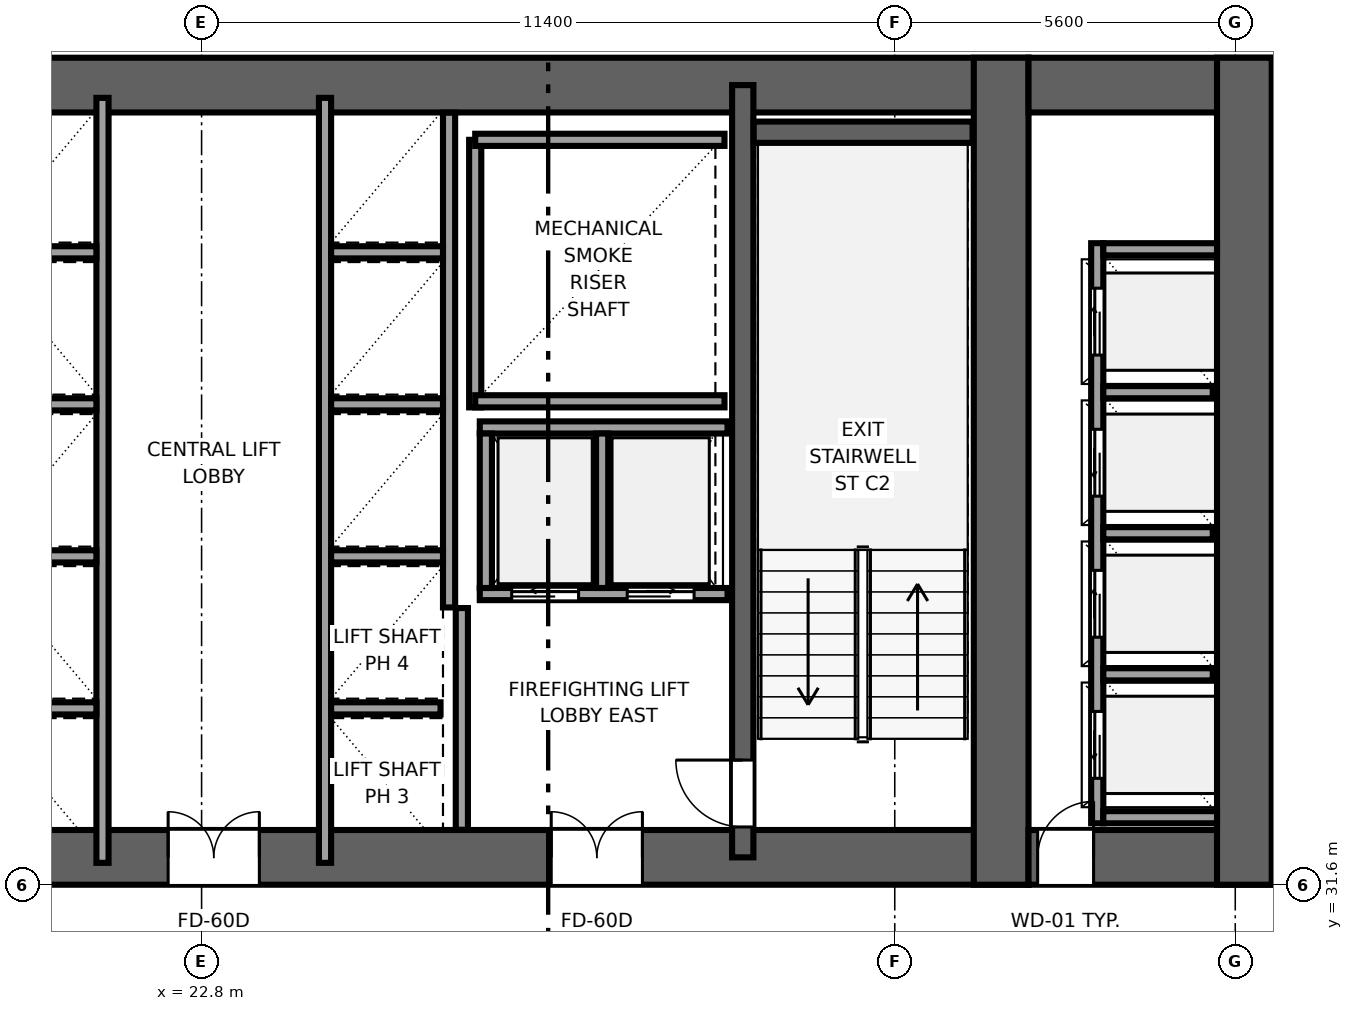
"""IFC4 building model, lengths in metres.
Left out: names, types, materials, properties, quantities, classifications, styles, units other than length and angle.
Written with IfcOpenShell. Run it as: python <this file> out.ifc"""

import sys

from ifc_helpers import new_model, si_unit, direction, frame, frame_2d, origin, place, context, subcontext, project, spatial, rectangle, extrude, source, transform, mapped, element, fill, save


model = new_model("IFC4")
c1 = context("Model", 3, precision=1e-05, world=origin(), true_north=direction((0.0, 1.0)))
c2 = subcontext(c1, "Body", "Model", "MODEL_VIEW")
j1 = project(units=[si_unit("LENGTHUNIT", "METRE"), si_unit("PLANEANGLEUNIT", "RADIAN")], contexts=[c1])
p1 = place(None, origin())
s1 = spatial("IfcSite", under=j1, at=p1, CompositionType="ELEMENT")
p2 = place(p1, origin())
s2 = spatial("IfcBuilding", under=s1, at=p2, CompositionType="ELEMENT")
p3 = place(p2, frame((0.0, 0.0, 35.55)))
s3 = spatial("IfcBuildingStorey", under=s2, at=p3, CompositionType="ELEMENT", Elevation=35.55)
p4 = place(p3, frame((9.6, 32.05, 0.0), z_axis=(0.0, 0.0, 1.0), x_axis=(1.0, 0.0, 0.0)))
e1 = element("IfcWall", 1, at=p4, inside=s3, PredefinedType="SHEAR", context=c2, shape_type="SweptSolid", body=[
    extrude(rectangle(XDim=26.8, YDim=0.9, at=frame_2d((13.4, 0.0))), origin(), (0.0, 0.0, 1.0), 3.55),
])
p5 = place(p4, frame((6.52, 0.0, 0.0), z_axis=(0.0, 0.0, 1.0), x_axis=(-1.0, 0.0, 0.0)))
e2 = element("IfcOpeningElement", 2, at=p5, cuts=e1, PredefinedType="OPENING", context=c2, shape_type="SweptSolid", body=[
    extrude(rectangle(XDim=1.5, YDim=2.04, at=frame_2d((0.75, 1.02))), frame((0.0, 0.46, 0.0), z_axis=(0.0, -1.0, 0.0), x_axis=(1.0, 0.0, 0.0)), (0.0, 0.0, 1.0), 0.92),
])
p6 = place(p4, frame((14.15, 0.0, 0.0), z_axis=(0.0, 0.0, 1.0), x_axis=(-1.0, 0.0, 0.0)))
e3 = element("IfcOpeningElement", 3, at=p6, cuts=e1, PredefinedType="OPENING", context=c2, shape_type="SweptSolid", body=[
    extrude(rectangle(XDim=1.5, YDim=2.04, at=frame_2d((0.75, 1.02))), frame((0.0, 0.46, 0.0), z_axis=(0.0, -1.0, 0.0), x_axis=(1.0, 0.0, 0.0)), (0.0, 0.0, 1.0), 0.92),
])
p7 = place(p4, frame((20.45, 0.0, 0.0), z_axis=(0.0, 0.0, 1.0), x_axis=(-1.0, 0.0, 0.0)))
e4 = element("IfcOpeningElement", 4, at=p7, cuts=e1, PredefinedType="OPENING", context=c2, shape_type="SweptSolid", body=[
    extrude(rectangle(XDim=1.5, YDim=2.04, at=frame_2d((0.75, 1.02))), frame((0.0, 0.46, 0.0), z_axis=(0.0, -1.0, 0.0), x_axis=(1.0, 0.0, 0.0)), (0.0, 0.0, 1.0), 0.92),
])
p8 = place(p4, frame((8.57, 0.0, 0.0), z_axis=(0.0, 0.0, 1.0), x_axis=(-1.0, 0.0, 0.0)))
e5 = element("IfcOpeningElement", 5, at=p8, cuts=e1, PredefinedType="OPENING", context=c2, shape_type="SweptSolid", body=[
    extrude(rectangle(XDim=0.82, YDim=2.01, at=frame_2d((0.41, 1.005))), frame((0.0, 0.46, 0.0), z_axis=(0.0, -1.0, 0.0), x_axis=(1.0, 0.0, 0.0)), (0.0, 0.0, 1.0), 0.92),
])
p9 = place(p3, frame((9.6, 44.75, 0.0), z_axis=(0.0, 0.0, 1.0), x_axis=(1.0, 0.0, 0.0)))
e6 = element("IfcWall", 6, at=p9, inside=s3, PredefinedType="SHEAR", context=c2, shape_type="SweptSolid", body=[
    extrude(rectangle(XDim=26.8, YDim=0.9, at=frame_2d((13.4, 0.0))), origin(), (0.0, 0.0, 1.0), 3.55),
])
p10 = place(p3, frame((35.95, 31.6, 0.0), z_axis=(0.0, 0.0, 1.0), x_axis=(0.0, 1.0, 0.0)))
e7 = element("IfcWall", 7, at=p10, inside=s3, PredefinedType="SHEAR", context=c2, shape_type="SweptSolid", body=[
    extrude(rectangle(XDim=13.6, YDim=0.9, at=frame_2d((6.8, 0.0))), origin(), (0.0, 0.0, 1.0), 3.55),
])
p11 = place(p3, frame((31.7, 32.05, 0.0), z_axis=(0.0, 0.0, 1.0), x_axis=(0.0, 1.0, 0.0)))
e8 = element("IfcWall", 8, at=p11, inside=s3, PredefinedType="SHEAR", context=c2, shape_type="SweptSolid", body=[
    extrude(rectangle(XDim=12.7, YDim=0.35, at=frame_2d((6.35, 0.0))), origin(), (0.0, 0.0, 1.0), 3.55),
])
p12 = place(p11, frame((1.6, 0.0, 0.0), z_axis=(0.0, 0.0, 1.0), x_axis=(-1.0, 0.0, 0.0)))
e9 = element("IfcOpeningElement", 9, at=p12, cuts=e8, PredefinedType="OPENING", context=c2, shape_type="SweptSolid", body=[
    extrude(rectangle(XDim=1.1, YDim=2.12, at=frame_2d((0.55, 1.06))), frame((0.0, 0.185, 0.0), z_axis=(0.0, -1.0, 0.0), x_axis=(1.0, 0.0, 0.0)), (0.0, 0.0, 1.0), 0.37),
])
p13 = place(p3, frame((36.4, 32.05, 0.0), z_axis=(0.0, 0.0, 1.0), x_axis=(1.0, 0.0, 0.0)))
e10 = element("IfcWall", 10, at=p13, inside=s3, PredefinedType="SHEAR", context=c2, shape_type="SweptSolid", body=[
    extrude(rectangle(XDim=4.0, YDim=0.9, at=frame_2d((2.0, 0.0))), origin(), (0.0, 0.0, 1.0), 3.55),
])
p14 = place(p13, frame((1.07, 0.0, 0.0), z_axis=(0.0, 0.0, 1.0), x_axis=(-1.0, 0.0, 0.0)))
e11 = element("IfcOpeningElement", 11, at=p14, cuts=e10, PredefinedType="OPENING", context=c2, shape_type="SweptSolid", body=[
    extrude(rectangle(XDim=0.92, YDim=2.01, at=frame_2d((0.46, 1.005))), frame((0.0, 0.46, 0.0), z_axis=(0.0, -1.0, 0.0), x_axis=(1.0, 0.0, 0.0)), (0.0, 0.0, 1.0), 0.92),
])
p15 = place(p3, frame((36.4, 44.75, 0.0), z_axis=(0.0, 0.0, 1.0), x_axis=(1.0, 0.0, 0.0)))
e12 = element("IfcWall", 12, at=p15, inside=s3, PredefinedType="SHEAR", context=c2, shape_type="SweptSolid", body=[
    extrude(rectangle(XDim=4.0, YDim=0.9, at=frame_2d((2.0, 0.0))), origin(), (0.0, 0.0, 1.0), 3.55),
])
p16 = place(p3, frame((39.95, 31.6, 0.0), z_axis=(0.0, 0.0, 1.0), x_axis=(0.0, 1.0, 0.0)))
e13 = element("IfcWall", 13, at=p16, inside=s3, PredefinedType="SHEAR", context=c2, shape_type="SweptSolid", body=[
    extrude(rectangle(XDim=13.6, YDim=0.9, at=frame_2d((6.8, 0.0))), origin(), (0.0, 0.0, 1.0), 3.55),
])
p17 = place(p3, frame((31.88, 43.975, 0.0), z_axis=(0.0, 0.0, 1.0), x_axis=(1.0, 0.0, 0.0)))
e14 = element("IfcWall", 14, at=p17, inside=s3, PredefinedType="SHEAR", context=c2, shape_type="SweptSolid", body=[
    extrude(rectangle(XDim=3.6, YDim=0.35, at=frame_2d((1.8, 0.0))), origin(), (0.0, 0.0, 1.0), 3.55),
])
p18 = place(p3, frame((27.3, 39.45, 0.0), z_axis=(0.0, 0.0, 1.0), x_axis=(0.0, 1.0, 0.0)))
e15 = element("IfcWall", 15, at=p18, inside=s3, PredefinedType="SOLIDWALL", context=c2, shape_type="SweptSolid", body=[
    extrude(rectangle(XDim=4.4, YDim=0.2, at=frame_2d((2.2, 0.0))), origin(), (0.0, 0.0, 1.0), 3.37),
])
for number, where, z_axis, x_axis in (
    (16, (27.3, 39.55, 0.0), (0.0, 0.0, 1.0), (1.0, 0.0, 0.0)),
    (17, (27.3, 43.85, 0.0), (0.0, 0.0, 1.0), (1.0, 0.0, 0.0)),
):
    element("IfcWall", number, at=place(p3, frame(where, z_axis=z_axis, x_axis=x_axis)), inside=s3, PredefinedType="SOLIDWALL", context=c2, shape_type="SweptSolid", body=[
        extrude(rectangle(XDim=4.1, YDim=0.2, at=frame_2d((2.05, 0.0))), origin(), (0.0, 0.0, 1.0), 3.37),
    ])
p19 = place(p3, frame((27.08, 32.504, 0.0), z_axis=(0.0, 0.0, 1.0), x_axis=(0.0, 1.0, 0.0)))
e18 = element("IfcWall", 18, at=p19, inside=s3, PredefinedType="SOLIDWALL", context=c2, shape_type="SweptSolid", body=[
    extrude(rectangle(XDim=3.646, YDim=0.2, at=frame_2d((1.823, 0.0))), origin(), (0.0, 0.0, 1.0), 3.37),
])
p20 = place(p3, frame((21.17, 31.96, 0.0), z_axis=(0.0, 0.0, 1.0), x_axis=(0.0, 1.0, 0.0)))
e19 = element("IfcWall", 19, at=p20, inside=s3, PredefinedType="SOLIDWALL", context=c2, shape_type="SweptSolid", body=[
    extrude(rectangle(XDim=12.58, YDim=0.2, at=frame_2d((6.29, 0.0))), origin(), (0.0, 0.0, 1.0), 3.37),
])
p21 = place(p3, frame((19.27, 34.5, 0.0), z_axis=(0.0, 0.0, 1.0), x_axis=(1.0, 0.0, 0.0)))
e20 = element("IfcWall", 20, at=p21, inside=s3, PredefinedType="SOLIDWALL", context=c2, shape_type="SweptSolid", body=[
    extrude(rectangle(XDim=1.8, YDim=0.2, at=frame_2d((0.9, 0.0))), origin(), (0.0, 0.0, 1.0), 3.37),
])
for number, where, z_axis, x_axis in (
    (21, (19.23, 37.0, 0.0), (0.0, 0.0, 1.0), (1.0, 0.0, 0.0)),
    (22, (19.23, 39.5, 0.0), (0.0, 0.0, 1.0), (1.0, 0.0, 0.0)),
    (23, (19.23, 42.0, 0.0), (0.0, 0.0, 1.0), (1.0, 0.0, 0.0)),
):
    element("IfcWall", number, at=place(p3, frame(where, z_axis=z_axis, x_axis=x_axis)), inside=s3, PredefinedType="SOLIDWALL", context=c2, shape_type="SweptSolid", body=[
        extrude(rectangle(XDim=1.84, YDim=0.2, at=frame_2d((0.92, 0.0))), origin(), (0.0, 0.0, 1.0), 3.37),
    ])
p22 = place(p3, frame((27.375, 36.38, 0.0), z_axis=(0.0, 0.0, 1.0), x_axis=(1.0, 0.0, 0.0)))
e24 = element("IfcWall", 24, at=p22, inside=s3, PredefinedType="SOLIDWALL", context=c2, shape_type="SweptSolid", body=[
    extrude(rectangle(XDim=4.075, YDim=0.2, at=frame_2d((2.038, 0.0))), origin(), (0.0, 0.0, 1.0), 3.37),
])
p23 = place(p22, frame((0.525, 0.0, 0.0)))
e25 = element("IfcOpeningElement", 25, at=p23, cuts=e24, PredefinedType="OPENING", context=c2, shape_type="SweptSolid", body=[
    extrude(rectangle(XDim=1.1, YDim=2.12, at=frame_2d((0.55, 1.06))), frame((0.0, 0.11, 0.0), z_axis=(0.0, -1.0, 0.0), x_axis=(1.0, 0.0, 0.0)), (0.0, 0.0, 1.0), 0.22),
])
p24 = place(p22, frame((2.425, 0.0, 0.0)))
e26 = element("IfcOpeningElement", 26, at=p24, cuts=e24, PredefinedType="OPENING", context=c2, shape_type="SweptSolid", body=[
    extrude(rectangle(XDim=1.1, YDim=2.12, at=frame_2d((0.55, 1.06))), frame((0.0, 0.11, 0.0), z_axis=(0.0, -1.0, 0.0), x_axis=(1.0, 0.0, 0.0)), (0.0, 0.0, 1.0), 0.22),
])
p25 = place(p3, frame((27.375, 39.12, 0.0), z_axis=(0.0, 0.0, 1.0), x_axis=(1.0, 0.0, 0.0)))
e27 = element("IfcWall", 27, at=p25, inside=s3, PredefinedType="SOLIDWALL", context=c2, shape_type="SweptSolid", body=[
    extrude(rectangle(XDim=4.075, YDim=0.2, at=frame_2d((2.038, 0.0))), origin(), (0.0, 0.0, 1.0), 3.37),
])
for number, where, z_axis, x_axis in (
    (28, (27.475, 36.48, 0.0), (0.0, 0.0, 1.0), (0.0, 1.0, 0.0)),
    (29, (29.387, 36.48, 0.0), (0.0, 0.0, 1.0), (0.0, 1.0, 0.0)),
):
    element("IfcWall", number, at=place(p3, frame(where, z_axis=z_axis, x_axis=x_axis)), inside=s3, PredefinedType="SOLIDWALL", context=c2, shape_type="SweptSolid", body=[
        extrude(rectangle(XDim=2.54, YDim=0.2, at=frame_2d((1.27, 0.0))), origin(), (0.0, 0.0, 1.0), 3.37),
    ])
p26 = place(p3, frame((24.83, 31.96, 0.0), z_axis=(0.0, 0.0, 1.0), x_axis=(0.0, 1.0, 0.0)))
e30 = element("IfcWall", 30, at=p26, inside=s3, PredefinedType="SOLIDWALL", context=c2, shape_type="SweptSolid", body=[
    extrude(rectangle(XDim=12.58, YDim=0.2, at=frame_2d((6.29, 0.0))), origin(), (0.0, 0.0, 1.0), 3.37),
])
p27 = place(p3, frame((26.87, 36.16, 0.0), z_axis=(0.0, 0.0, 1.0), x_axis=(0.0, 1.0, 0.0)))
e31 = element("IfcWall", 31, at=p27, inside=s3, PredefinedType="SOLIDWALL", context=c2, shape_type="SweptSolid", body=[
    extrude(rectangle(XDim=8.136, YDim=0.2, at=frame_2d((4.068, 0.0))), origin(), (0.0, 0.0, 1.0), 3.37),
])
p28 = place(p3, frame((24.93, 34.5, 0.0), z_axis=(0.0, 0.0, 1.0), x_axis=(1.0, 0.0, 0.0)))
e32 = element("IfcWall", 32, at=p28, inside=s3, PredefinedType="SOLIDWALL", context=c2, shape_type="SweptSolid", body=[
    extrude(rectangle(XDim=1.8, YDim=0.2, at=frame_2d((0.9, 0.0))), origin(), (0.0, 0.0, 1.0), 3.37),
])
for number, where, z_axis, x_axis in (
    (33, (24.93, 37.0, 0.0), (0.0, 0.0, 1.0), (1.0, 0.0, 0.0)),
    (34, (24.93, 39.5, 0.0), (0.0, 0.0, 1.0), (1.0, 0.0, 0.0)),
    (35, (24.93, 42.0, 0.0), (0.0, 0.0, 1.0), (1.0, 0.0, 0.0)),
):
    element("IfcWall", number, at=place(p3, frame(where, z_axis=z_axis, x_axis=x_axis)), inside=s3, PredefinedType="SOLIDWALL", context=c2, shape_type="SweptSolid", body=[
        extrude(rectangle(XDim=1.84, YDim=0.2, at=frame_2d((0.92, 0.0))), origin(), (0.0, 0.0, 1.0), 3.37),
    ])
p29 = place(p3, frame((37.53, 32.61, 0.0), z_axis=(0.0, 0.0, 1.0), x_axis=(0.0, 1.0, 0.0)))
e36 = element("IfcWall", 36, at=p29, inside=s3, PredefinedType="SOLIDWALL", context=c2, shape_type="SweptSolid", body=[
    extrude(rectangle(XDim=9.54, YDim=0.2, at=frame_2d((4.77, 0.0))), origin(), (0.0, 0.0, 1.0), 3.37),
])
p30 = place(p29, frame((0.74, 0.0, 0.0)))
e37 = element("IfcOpeningElement", 37, at=p30, cuts=e36, PredefinedType="OPENING", context=c2, shape_type="SweptSolid", body=[
    extrude(rectangle(XDim=1.1, YDim=2.12, at=frame_2d((0.55, 1.06))), frame((0.0, 0.11, 0.0), z_axis=(0.0, -1.0, 0.0), x_axis=(1.0, 0.0, 0.0)), (0.0, 0.0, 1.0), 0.22),
])
p31 = place(p29, frame((3.06, 0.0, 0.0)))
e38 = element("IfcOpeningElement", 38, at=p31, cuts=e36, PredefinedType="OPENING", context=c2, shape_type="SweptSolid", body=[
    extrude(rectangle(XDim=1.1, YDim=2.12, at=frame_2d((0.55, 1.06))), frame((0.0, 0.11, 0.0), z_axis=(0.0, -1.0, 0.0), x_axis=(1.0, 0.0, 0.0)), (0.0, 0.0, 1.0), 0.22),
])
p32 = place(p29, frame((5.38, 0.0, 0.0)))
e39 = element("IfcOpeningElement", 39, at=p32, cuts=e36, PredefinedType="OPENING", context=c2, shape_type="SweptSolid", body=[
    extrude(rectangle(XDim=1.1, YDim=2.12, at=frame_2d((0.55, 1.06))), frame((0.0, 0.11, 0.0), z_axis=(0.0, -1.0, 0.0), x_axis=(1.0, 0.0, 0.0)), (0.0, 0.0, 1.0), 0.22),
])
p33 = place(p29, frame((7.7, 0.0, 0.0)))
e40 = element("IfcOpeningElement", 40, at=p33, cuts=e36, PredefinedType="OPENING", context=c2, shape_type="SweptSolid", body=[
    extrude(rectangle(XDim=1.1, YDim=2.12, at=frame_2d((0.55, 1.06))), frame((0.0, 0.11, 0.0), z_axis=(0.0, -1.0, 0.0), x_axis=(1.0, 0.0, 0.0)), (0.0, 0.0, 1.0), 0.22),
])
for number, where, z_axis, x_axis in (
    (41, (37.63, 32.71, 0.0), (0.0, 0.0, 1.0), (1.0, 0.0, 0.0)),
    (42, (37.63, 42.05, 0.0), (0.0, 0.0, 1.0), (1.0, 0.0, 0.0)),
):
    element("IfcWall", number, at=place(p3, frame(where, z_axis=z_axis, x_axis=x_axis)), inside=s3, PredefinedType="SOLIDWALL", context=c2, shape_type="SweptSolid", body=[
        extrude(rectangle(XDim=1.87, YDim=0.2, at=frame_2d((0.935, 0.0))), origin(), (0.0, 0.0, 1.0), 3.37),
    ])
for number, where, z_axis, x_axis in (
    (43, (37.63, 35.06, 0.0), (0.0, 0.0, 1.0), (1.0, 0.0, 0.0)),
    (44, (37.63, 37.38, 0.0), (0.0, 0.0, 1.0), (1.0, 0.0, 0.0)),
    (45, (37.63, 39.7, 0.0), (0.0, 0.0, 1.0), (1.0, 0.0, 0.0)),
):
    element("IfcWall", number, at=place(p3, frame(where, z_axis=z_axis, x_axis=x_axis)), inside=s3, PredefinedType="SOLIDWALL", context=c2, shape_type="SweptSolid", body=[
        extrude(rectangle(XDim=1.8, YDim=0.2, at=frame_2d((0.9, 0.0))), origin(), (0.0, 0.0, 1.0), 3.37),
    ])
m1 = source(origin(), c2, "Body", "SweptSolid", [
    extrude(rectangle(XDim=1.1, YDim=2.12, at=frame_2d((0.55, 1.06))), frame((0.0, 0.025, 0.0), z_axis=(0.0, -1.0, 0.0), x_axis=(1.0, 0.0, 0.0)), (0.0, 0.0, 1.0), 0.05),
])
p34 = place(p12, origin())
e46 = element("IfcDoor", 46, at=p34, inside=s3, OperationType="SINGLE_SWING_RIGHT", PredefinedType="DOOR", context=c2, shape_type="MappedRepresentation", body=[
    mapped(m1, transform((0.0, 0.0, 0.0), x_axis=(1.0, 0.0, 0.0), y_axis=(0.0, 1.0, 0.0), z_axis=(0.0, 0.0, 1.0), scale=1.0)),
])
fill(e9, e46)
m2 = source(origin(), c2, "Body", "SweptSolid", [
    extrude(rectangle(XDim=1.5, YDim=2.04, at=frame_2d((0.75, 1.02))), frame((0.0, 0.025, 0.0), z_axis=(0.0, -1.0, 0.0), x_axis=(1.0, 0.0, 0.0)), (0.0, 0.0, 1.0), 0.05),
])
p35 = place(p6, origin())
e47 = element("IfcDoor", 47, at=p35, inside=s3, OperationType="DOUBLE_DOOR_SINGLE_SWING", PredefinedType="DOOR", context=c2, shape_type="MappedRepresentation", body=[
    mapped(m2, transform((0.0, 0.0, 0.0), x_axis=(1.0, 0.0, 0.0), y_axis=(0.0, 1.0, 0.0), z_axis=(0.0, 0.0, 1.0), scale=1.0)),
])
fill(e3, e47)
p36 = place(p7, origin())
e48 = element("IfcDoor", 48, at=p36, inside=s3, OperationType="DOUBLE_DOOR_SINGLE_SWING", PredefinedType="DOOR", context=c2, shape_type="MappedRepresentation", body=[
    mapped(m2, transform((0.0, 0.0, 0.0), x_axis=(1.0, 0.0, 0.0), y_axis=(0.0, 1.0, 0.0), z_axis=(0.0, 0.0, 1.0), scale=1.0)),
])
fill(e4, e48)
m3 = source(origin(), c2, "Body", "SweptSolid", [
    extrude(rectangle(XDim=0.92, YDim=2.01, at=frame_2d((0.46, 1.005))), frame((0.0, 0.025, 0.0), z_axis=(0.0, -1.0, 0.0), x_axis=(1.0, 0.0, 0.0)), (0.0, 0.0, 1.0), 0.05),
])
p37 = place(p14, origin())
e49 = element("IfcDoor", 49, at=p37, inside=s3, OperationType="SINGLE_SWING_RIGHT", PredefinedType="DOOR", context=c2, shape_type="MappedRepresentation", body=[
    mapped(m3, transform((0.0, 0.0, 0.0), x_axis=(1.0, 0.0, 0.0), y_axis=(0.0, 1.0, 0.0), z_axis=(0.0, 0.0, 1.0), scale=1.0)),
])
fill(e11, e49)
m4 = source(origin(), c2, "Body", "SweptSolid", [
    extrude(rectangle(XDim=1.1, YDim=2.12, at=frame_2d((0.55, 1.06))), frame((0.0, 0.025, 0.0), z_axis=(0.0, -1.0, 0.0), x_axis=(1.0, 0.0, 0.0)), (0.0, 0.0, 1.0), 0.05),
])
p38 = place(p23, origin())
e50 = element("IfcDoor", 50, at=p38, inside=s3, OperationType="SLIDING_TO_LEFT", PredefinedType="DOOR", context=c2, shape_type="MappedRepresentation", body=[
    mapped(m4, transform((0.0, 0.0, 0.0), x_axis=(1.0, 0.0, 0.0), y_axis=(0.0, 1.0, 0.0), z_axis=(0.0, 0.0, 1.0), scale=1.0)),
])
fill(e25, e50)
p39 = place(p24, origin())
e51 = element("IfcDoor", 51, at=p39, inside=s3, OperationType="SLIDING_TO_RIGHT", PredefinedType="DOOR", context=c2, shape_type="MappedRepresentation", body=[
    mapped(m4, transform((0.0, 0.0, 0.0), x_axis=(1.0, 0.0, 0.0), y_axis=(0.0, 1.0, 0.0), z_axis=(0.0, 0.0, 1.0), scale=1.0)),
])
fill(e26, e51)
p40 = place(p30, origin())
e52 = element("IfcDoor", 52, at=p40, inside=s3, OperationType="SLIDING_TO_LEFT", PredefinedType="DOOR", context=c2, shape_type="MappedRepresentation", body=[
    mapped(m4, transform((0.0, 0.0, 0.0), x_axis=(1.0, 0.0, 0.0), y_axis=(0.0, 1.0, 0.0), z_axis=(0.0, 0.0, 1.0), scale=1.0)),
])
fill(e37, e52)
p41 = place(p31, origin())
e53 = element("IfcDoor", 53, at=p41, inside=s3, OperationType="SLIDING_TO_RIGHT", PredefinedType="DOOR", context=c2, shape_type="MappedRepresentation", body=[
    mapped(m4, transform((0.0, 0.0, 0.0), x_axis=(1.0, 0.0, 0.0), y_axis=(0.0, 1.0, 0.0), z_axis=(0.0, 0.0, 1.0), scale=1.0)),
])
fill(e38, e53)
p42 = place(p32, origin())
e54 = element("IfcDoor", 54, at=p42, inside=s3, OperationType="SLIDING_TO_LEFT", PredefinedType="DOOR", context=c2, shape_type="MappedRepresentation", body=[
    mapped(m4, transform((0.0, 0.0, 0.0), x_axis=(1.0, 0.0, 0.0), y_axis=(0.0, 1.0, 0.0), z_axis=(0.0, 0.0, 1.0), scale=1.0)),
])
fill(e39, e54)
p43 = place(p33, origin())
e55 = element("IfcDoor", 55, at=p43, inside=s3, OperationType="SLIDING_TO_RIGHT", PredefinedType="DOOR", context=c2, shape_type="MappedRepresentation", body=[
    mapped(m4, transform((0.0, 0.0, 0.0), x_axis=(1.0, 0.0, 0.0), y_axis=(0.0, 1.0, 0.0), z_axis=(0.0, 0.0, 1.0), scale=1.0)),
])
fill(e40, e55)
save(model, sys.argv[1])
